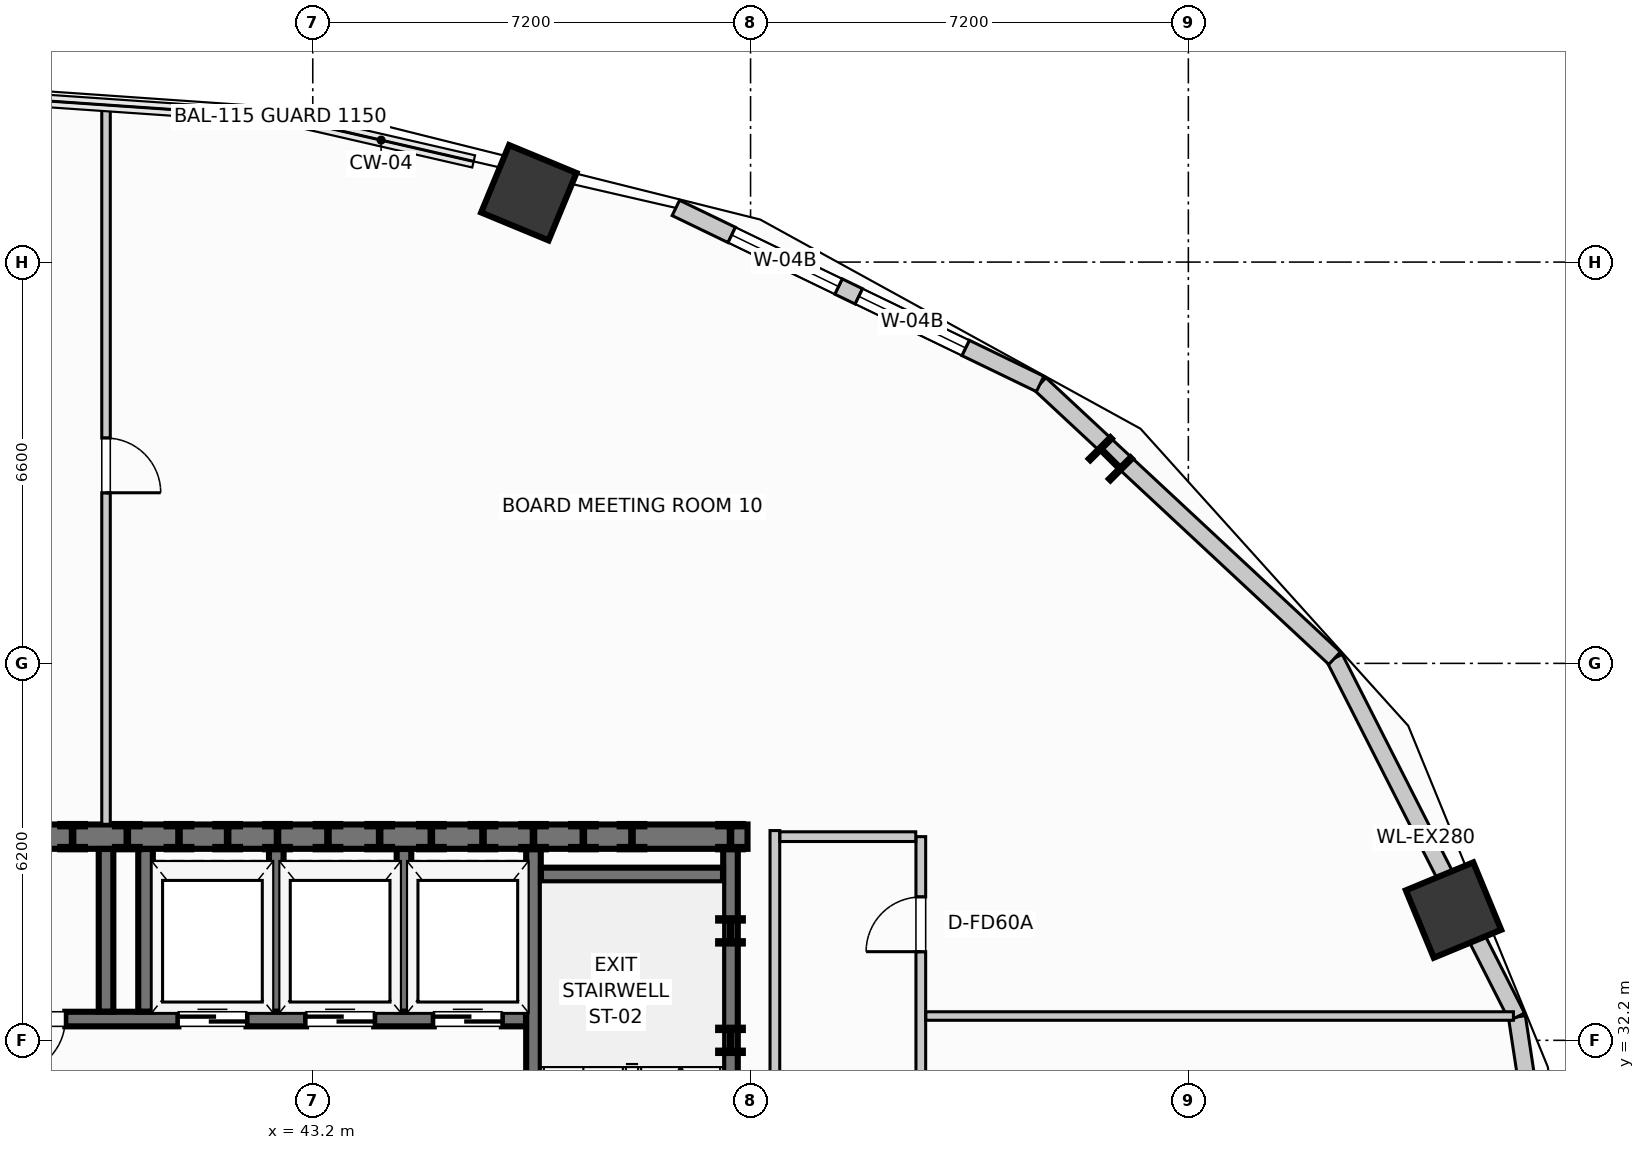
"""IFC4 building model, lengths in metres.
Left out: names, types, materials, properties, quantities, classifications, styles, units other than length and angle.
Written with IfcOpenShell. Run it as: python <this file> out.ifc"""

import sys

from ifc_helpers import new_model, si_unit, direction, frame, frame_2d, origin, origin_2d, place, context, subcontext, project, spatial, rectangle, i_section, extrude, element, fill, save


model = new_model("IFC4")
c1 = context("Model", 3, precision=1e-05, world=origin(), true_north=direction((0.0, 1.0)))
c2 = subcontext(c1, "Body", "Model", "MODEL_VIEW")
j1 = project(units=[si_unit("LENGTHUNIT", "METRE"), si_unit("PLANEANGLEUNIT", "RADIAN")], contexts=[c1])
p1 = place(None, origin())
s1 = spatial("IfcSite", under=j1, at=p1, CompositionType="ELEMENT")
p2 = place(p1, origin())
s2 = spatial("IfcBuilding", under=s1, at=p2, CompositionType="ELEMENT")
p3 = place(p2, frame((0.0, 0.0, 200.35)))
s3 = spatial("IfcBuildingStorey", under=s2, at=p3, CompositionType="ELEMENT", Elevation=200.35)
for number, where, z_axis, x_axis in (
    (1, (40.15, 35.55, 0.0), (0.0, 0.0, 1.0), (1.0, 0.0, 0.0)),
    (2, (41.8, 35.55, 0.0), (0.0, 0.0, 1.0), (1.0, 0.0, 0.0)),
    (3, (43.45, 35.55, 0.0), (0.0, 0.0, 1.0), (1.0, 0.0, 0.0)),
    (4, (45.15, 35.55, 0.0), (0.0, 0.0, 1.0), (1.0, 0.0, 0.0)),
    (5, (46.83, 35.55, 0.0), (0.0, 0.0, 1.0), (1.0, 0.0, 0.0)),
    (6, (48.45, 35.55, 0.0), (0.0, 0.0, 1.0), (1.0, 0.0, 0.0)),
    (7, (50.07, 35.55, 0.0), (0.0, 0.0, 1.0), (1.0, 0.0, 0.0)),
    (8, (50.07, 32.2, 0.0), (0.0, 0.0, 1.0), (1.0, 0.0, 0.0)),
    (9, (50.07, 34.0, 0.0), (0.0, 0.0, 1.0), (1.0, 0.0, 0.0)),
    (10, (42.62, 35.55, 0.0), (0.0, 0.0, 1.0), (1.0, 0.0, 0.0)),
    (11, (47.65, 35.55, 0.0), (0.0, 0.0, 1.0), (1.0, 0.0, 0.0)),
    (12, (39.25, 35.55, 0.0), (0.0, 0.0, 1.0), (1.0, 0.0, 0.0)),
    (13, (41.0, 35.55, 0.0), (0.0, 0.0, 1.0), (1.0, 0.0, 0.0)),
    (14, (44.3, 35.55, 0.0), (0.0, 0.0, 1.0), (1.0, 0.0, 0.0)),
    (15, (46.0, 35.55, 0.0), (0.0, 0.0, 1.0), (1.0, 0.0, 0.0)),
):
    element("IfcColumn", number, at=place(p3, frame(where, z_axis=z_axis, x_axis=x_axis)), inside=s3, PredefinedType="COLUMN", context=c2, shape_type="SweptSolid", body=[
        extrude(i_section(OverallWidth=0.406, OverallDepth=0.416, WebThickness=0.024, FlangeThickness=0.039, at=origin_2d()), origin(), (0.0, 0.0, 1.0), 4.5),
    ])
p4 = place(p3, frame((61.961, 34.343, 0.0), z_axis=(0.0, 0.0, 1.0), x_axis=(0.923879532511, 0.382683432365, 0.0)))
e16 = element("IfcColumn", 16, at=p4, inside=s3, PredefinedType="COLUMN", context=c2, shape_type="SweptSolid", body=[
    extrude(rectangle(XDim=1.2, YDim=1.2, at=origin_2d()), origin(), (0.0, 0.0, 1.0), 4.5),
])
p5 = place(p3, frame((56.318, 41.765, 0.0), z_axis=(0.0, 0.0, 1.0), x_axis=(0.707106781187, 0.707106781187, 0.0)))
e17 = element("IfcColumn", 17, at=p5, inside=s3, PredefinedType="COLUMN", context=c2, shape_type="SweptSolid", body=[
    extrude(i_section(OverallWidth=0.5, OverallDepth=0.5, WebThickness=0.022, FlangeThickness=0.032, at=origin_2d()), origin(), (0.0, 0.0, 1.0), 4.5),
])
p6 = place(p3, frame((46.753, 46.141, 0.0), z_axis=(0.0, 0.0, 1.0), x_axis=(0.382683432365, 0.923879532511, 0.0)))
e18 = element("IfcColumn", 18, at=p6, inside=s3, PredefinedType="COLUMN", context=c2, shape_type="SweptSolid", body=[
    extrude(rectangle(XDim=1.2, YDim=1.2, at=origin_2d()), origin(), (0.0, 0.0, 1.0), 4.5),
])
p7 = place(p3, frame((64.006, 26.0, 0.0), z_axis=(0.0, 0.0, 1.0), x_axis=(-0.150467697578, 0.988614926038, 0.0)))
e19 = element("IfcWall", 19, at=p7, inside=s3, PredefinedType="STANDARD", context=c2, shape_type="SweptSolid", body=[
    extrude(rectangle(XDim=6.661, YDim=0.28, at=frame_2d((3.33, 0.0))), origin(), (0.0, 0.0, 1.0), 4.26),
])
p8 = place(p7, frame((3.047, 0.0, 0.75)))
e20 = element("IfcOpeningElement", 20, at=p8, cuts=e19, PredefinedType="OPENING", context=c2, shape_type="SweptSolid", body=[
    extrude(rectangle(XDim=1.95, YDim=1.68, at=frame_2d((0.975, 0.84))), frame((0.0, 0.15, 0.0), z_axis=(0.0, -1.0, 0.0), x_axis=(1.0, 0.0, 0.0)), (0.0, 0.0, 1.0), 0.3),
])
p9 = place(p3, frame((63.004, 32.585, 0.0), z_axis=(0.0, 0.0, 1.0), x_axis=(-0.453032066879, 0.89149422117, 0.0)))
e21 = element("IfcWall", 21, at=p9, inside=s3, PredefinedType="STANDARD", context=c2, shape_type="SweptSolid", body=[
    extrude(rectangle(XDim=6.619, YDim=0.28, at=frame_2d((3.31, 0.0))), origin(), (0.0, 0.0, 1.0), 3.691),
])
p10 = place(p3, frame((60.006, 38.485, 0.0), z_axis=(0.0, 0.0, 1.0), x_axis=(-0.731833707499, 0.681483253329, 0.0)))
e22 = element("IfcWall", 22, at=p10, inside=s3, PredefinedType="STANDARD", context=c2, shape_type="SweptSolid", body=[
    extrude(rectangle(XDim=6.619, YDim=0.28, at=frame_2d((3.309, 0.0))), origin(), (0.0, 0.0, 1.0), 3.691),
])
p11 = place(p3, frame((55.162, 42.996, 0.0), z_axis=(0.0, 0.0, 1.0), x_axis=(-0.900371236029, 0.435122554381, 0.0)))
e23 = element("IfcWall", 23, at=p11, inside=s3, PredefinedType="STANDARD", context=c2, shape_type="SweptSolid", body=[
    extrude(rectangle(XDim=6.653, YDim=0.28, at=frame_2d((3.327, 0.0))), origin(), (0.0, 0.0, 1.0), 4.26),
])
p12 = place(p11, frame((1.361, 0.0, 0.75)))
e24 = element("IfcOpeningElement", 24, at=p12, cuts=e23, PredefinedType="OPENING", context=c2, shape_type="SweptSolid", body=[
    extrude(rectangle(XDim=1.95, YDim=1.68, at=frame_2d((0.975, 0.84))), frame((0.0, 0.15, 0.0), z_axis=(0.0, -1.0, 0.0), x_axis=(1.0, 0.0, 0.0)), (0.0, 0.0, 1.0), 0.3),
])
p13 = place(p11, frame((3.682, 0.0, 0.75)))
e25 = element("IfcOpeningElement", 25, at=p13, cuts=e23, PredefinedType="OPENING", context=c2, shape_type="SweptSolid", body=[
    extrude(rectangle(XDim=1.95, YDim=1.68, at=frame_2d((0.975, 0.84))), frame((0.0, 0.15, 0.0), z_axis=(0.0, -1.0, 0.0), x_axis=(1.0, 0.0, 0.0)), (0.0, 0.0, 1.0), 0.3),
])
p14 = place(p3, frame((50.35, 35.55, 0.0), z_axis=(0.0, 0.0, 1.0), x_axis=(-1.0, 0.0, 0.0)))
e26 = element("IfcWall", 26, at=p14, inside=s3, PredefinedType="SHEAR", context=c2, shape_type="SweptSolid", body=[
    extrude(rectangle(XDim=28.7, YDim=0.4, at=frame_2d((14.35, 0.0))), origin(), (0.0, 0.0, 1.0), 4.5),
])
for number, where, z_axis, x_axis in (
    (27, (50.07, 26.953, 0.0), (0.0, 0.0, 1.0), (0.0, 1.0, 0.0)),
    (28, (46.83, 26.953, 0.0), (0.0, 0.0, 1.0), (0.0, 1.0, 0.0)),
):
    element("IfcWall", number, at=place(p3, frame(where, z_axis=z_axis, x_axis=x_axis)), inside=s3, PredefinedType="SHEAR", context=c2, shape_type="SweptSolid", body=[
        extrude(rectangle(XDim=8.394, YDim=0.24, at=frame_2d((4.197, 0.0))), origin(), (0.0, 0.0, 1.0), 4.5),
    ])
p15 = place(p3, frame((46.953, 34.92, 0.0), z_axis=(0.0, 0.0, 1.0), x_axis=(1.0, 0.0, 0.0)))
e29 = element("IfcWall", 29, at=p15, inside=s3, PredefinedType="SHEAR", context=c2, shape_type="SweptSolid", body=[
    extrude(rectangle(XDim=2.994, YDim=0.24, at=frame_2d((1.497, 0.0))), origin(), (0.0, 0.0, 1.0), 4.5),
])
p16 = place(p3, frame((33.493, 32.55, 0.0), z_axis=(0.0, 0.0, 1.0), x_axis=(1.0, 0.0, 0.0)))
e30 = element("IfcWall", 30, at=p16, inside=s3, PredefinedType="SHEAR", context=c2, shape_type="SweptSolid", body=[
    extrude(rectangle(XDim=13.214, YDim=0.24, at=frame_2d((6.607, 0.0))), origin(), (0.0, 0.0, 1.0), 4.5),
])
p17 = place(p16, frame((1.557, 0.0, 0.0)))
e31 = element("IfcOpeningElement", 31, at=p17, cuts=e30, PredefinedType="OPENING", context=c2, shape_type="SweptSolid", body=[
    extrude(rectangle(XDim=0.9, YDim=2.0, at=frame_2d((0.45, 1.0))), frame((0.0, 0.13, 0.0), z_axis=(0.0, -1.0, 0.0), x_axis=(1.0, 0.0, 0.0)), (0.0, 0.0, 1.0), 0.26),
])
p18 = place(p16, frame((4.737, 0.0, 0.0)))
e32 = element("IfcOpeningElement", 32, at=p18, cuts=e30, PredefinedType="OPENING", context=c2, shape_type="SweptSolid", body=[
    extrude(rectangle(XDim=0.9, YDim=2.0, at=frame_2d((0.45, 1.0))), frame((0.0, 0.13, 0.0), z_axis=(0.0, -1.0, 0.0), x_axis=(1.0, 0.0, 0.0)), (0.0, 0.0, 1.0), 0.26),
])
p19 = place(p16, frame((7.497, 0.0, 0.0)))
e33 = element("IfcOpeningElement", 33, at=p19, cuts=e30, PredefinedType="OPENING", context=c2, shape_type="SweptSolid", body=[
    extrude(rectangle(XDim=1.12, YDim=2.0, at=frame_2d((0.56, 1.0))), frame((0.0, 0.13, 0.0), z_axis=(0.0, -1.0, 0.0), x_axis=(1.0, 0.0, 0.0)), (0.0, 0.0, 1.0), 0.26),
])
p20 = place(p16, frame((9.597, 0.0, 0.0)))
e34 = element("IfcOpeningElement", 34, at=p20, cuts=e30, PredefinedType="OPENING", context=c2, shape_type="SweptSolid", body=[
    extrude(rectangle(XDim=1.12, YDim=2.0, at=frame_2d((0.56, 1.0))), frame((0.0, 0.13, 0.0), z_axis=(0.0, -1.0, 0.0), x_axis=(1.0, 0.0, 0.0)), (0.0, 0.0, 1.0), 0.26),
])
p21 = place(p16, frame((11.697, 0.0, 0.0)))
e35 = element("IfcOpeningElement", 35, at=p21, cuts=e30, PredefinedType="OPENING", context=c2, shape_type="SweptSolid", body=[
    extrude(rectangle(XDim=1.12, YDim=2.0, at=frame_2d((0.56, 1.0))), frame((0.0, 0.13, 0.0), z_axis=(0.0, -1.0, 0.0), x_axis=(1.0, 0.0, 0.0)), (0.0, 0.0, 1.0), 0.26),
])
for number, where, z_axis, x_axis in (
    (36, (39.8, 32.673, 0.0), (0.0, 0.0, 1.0), (0.0, 1.0, 0.0)),
    (37, (40.45, 32.673, 0.0), (0.0, 0.0, 1.0), (0.0, 1.0, 0.0)),
    (38, (42.6, 32.673, 0.0), (0.0, 0.0, 1.0), (0.0, 1.0, 0.0)),
    (39, (44.7, 32.673, 0.0), (0.0, 0.0, 1.0), (0.0, 1.0, 0.0)),
):
    element("IfcWall", number, at=place(p3, frame(where, z_axis=z_axis, x_axis=x_axis)), inside=s3, PredefinedType="SHEAR", context=c2, shape_type="SweptSolid", body=[
        extrude(rectangle(XDim=2.674, YDim=0.24, at=frame_2d((1.337, 0.0))), origin(), (0.0, 0.0, 1.0), 4.5),
    ])
p22 = place(p3, frame((53.2, 19.8, 0.0), z_axis=(0.0, 0.0, 1.0), x_axis=(0.0, 1.0, 0.0)))
e40 = element("IfcWall", 40, at=p22, inside=s3, PredefinedType="PARTITIONING", context=c2, shape_type="SweptSolid", body=[
    extrude(rectangle(XDim=15.75, YDim=0.16, at=frame_2d((7.875, 0.0))), origin(), (0.0, 0.0, 1.0), 4.245),
])
p23 = place(p22, frame((8.203, 0.0, 0.0)))
e41 = element("IfcOpeningElement", 41, at=p23, cuts=e40, PredefinedType="OPENING", context=c2, shape_type="SweptSolid", body=[
    extrude(rectangle(XDim=0.9, YDim=2.0, at=frame_2d((0.45, 1.0))), frame((0.0, 0.09, 0.0), z_axis=(0.0, -1.0, 0.0), x_axis=(1.0, 0.0, 0.0)), (0.0, 0.0, 1.0), 0.18),
])
p24 = place(p22, frame((13.858, 0.0, 0.0)))
e42 = element("IfcOpeningElement", 42, at=p24, cuts=e40, PredefinedType="OPENING", context=c2, shape_type="SweptSolid", body=[
    extrude(rectangle(XDim=0.9, YDim=2.0, at=frame_2d((0.45, 1.0))), frame((0.0, 0.09, 0.0), z_axis=(0.0, -1.0, 0.0), x_axis=(1.0, 0.0, 0.0)), (0.0, 0.0, 1.0), 0.18),
])
p25 = place(p3, frame((50.8, 26.65, 0.0), z_axis=(0.0, 0.0, 1.0), x_axis=(0.0, 1.0, 0.0)))
e43 = element("IfcWall", 43, at=p25, inside=s3, PredefinedType="PARTITIONING", context=c2, shape_type="SweptSolid", body=[
    extrude(rectangle(XDim=9.0, YDim=0.16, at=frame_2d((4.5, 0.0))), origin(), (0.0, 0.0, 1.0), 4.245),
])
p26 = place(p3, frame((50.883, 35.55, 0.0), z_axis=(0.0, 0.0, 1.0), x_axis=(1.0, 0.0, 0.0)))
e44 = element("IfcWall", 44, at=p26, inside=s3, PredefinedType="PARTITIONING", context=c2, shape_type="SweptSolid", body=[
    extrude(rectangle(XDim=2.234, YDim=0.16, at=frame_2d((1.117, 0.0))), origin(), (0.0, 0.0, 1.0), 4.245),
])
p27 = place(p3, frame((53.283, 32.6, 0.0), z_axis=(0.0, 0.0, 1.0), x_axis=(1.0, 0.0, 0.0)))
e45 = element("IfcWall", 45, at=p27, inside=s3, PredefinedType="PARTITIONING", context=c2, shape_type="SweptSolid", body=[
    extrude(rectangle(XDim=9.663, YDim=0.14, at=frame_2d((4.832, 0.0))), origin(), (0.0, 0.0, 1.0), 4.245),
])
p28 = place(p3, frame((39.8, 35.753, 0.0), z_axis=(0.0, 0.0, 1.0), x_axis=(0.0, 1.0, 0.0)))
e46 = element("IfcWall", 46, at=p28, inside=s3, PredefinedType="PARTITIONING", context=c2, shape_type="SweptSolid", body=[
    extrude(rectangle(XDim=11.786, YDim=0.14, at=frame_2d((5.893, 0.0))), origin(), (0.0, 0.0, 1.0), 4.245),
])
p29 = place(p28, frame((5.453, 0.0, 0.0)))
e47 = element("IfcOpeningElement", 47, at=p29, cuts=e46, PredefinedType="OPENING", context=c2, shape_type="SweptSolid", body=[
    extrude(rectangle(XDim=0.9, YDim=2.0, at=frame_2d((0.45, 1.0))), frame((0.0, 0.08, 0.0), z_axis=(0.0, -1.0, 0.0), x_axis=(1.0, 0.0, 0.0)), (0.0, 0.0, 1.0), 0.16),
])
p30 = place(p12, origin())
e48 = element("IfcWindow", 48, at=p30, inside=s3, PartitioningType="SINGLE_PANEL", PredefinedType="WINDOW", context=c2, shape_type="SweptSolid", body=[
    extrude(rectangle(XDim=1.95, YDim=1.68, at=frame_2d((0.975, 0.84))), frame((0.0, 0.03, 0.0), z_axis=(0.0, -1.0, 0.0), x_axis=(1.0, 0.0, 0.0)), (0.0, 0.0, 1.0), 0.06),
])
fill(e24, e48)
p31 = place(p13, origin())
e49 = element("IfcWindow", 49, at=p31, inside=s3, PartitioningType="SINGLE_PANEL", PredefinedType="WINDOW", context=c2, shape_type="SweptSolid", body=[
    extrude(rectangle(XDim=1.95, YDim=1.68, at=frame_2d((0.975, 0.84))), frame((0.0, 0.03, 0.0), z_axis=(0.0, -1.0, 0.0), x_axis=(1.0, 0.0, 0.0)), (0.0, 0.0, 1.0), 0.06),
])
fill(e25, e49)
p32 = place(p18, frame((0.9, 0.0, 0.0), z_axis=(0.0, 0.0, 1.0), x_axis=(-1.0, 0.0, 0.0)))
e50 = element("IfcDoor", 50, at=p32, inside=s3, OperationType="SINGLE_SWING_RIGHT", PredefinedType="DOOR", context=c2, shape_type="SweptSolid", body=[
    extrude(rectangle(XDim=0.9, YDim=2.0, at=frame_2d((0.45, 1.0))), frame((0.0, 0.025, 0.0), z_axis=(0.0, -1.0, 0.0), x_axis=(1.0, 0.0, 0.0)), (0.0, 0.0, 1.0), 0.05),
])
fill(e32, e50)
p33 = place(p19, origin())
e51 = element("IfcDoor", 51, at=p33, inside=s3, OperationType="DOUBLE_DOOR_SLIDING", PredefinedType="USERDEFINED", context=c2, shape_type="SweptSolid", body=[
    extrude(rectangle(XDim=1.12, YDim=2.0, at=frame_2d((0.56, 1.0))), frame((0.0, 0.025, 0.0), z_axis=(0.0, -1.0, 0.0), x_axis=(1.0, 0.0, 0.0)), (0.0, 0.0, 1.0), 0.05),
])
fill(e33, e51)
p34 = place(p20, origin())
e52 = element("IfcDoor", 52, at=p34, inside=s3, OperationType="DOUBLE_DOOR_SLIDING", PredefinedType="USERDEFINED", context=c2, shape_type="SweptSolid", body=[
    extrude(rectangle(XDim=1.12, YDim=2.0, at=frame_2d((0.56, 1.0))), frame((0.0, 0.025, 0.0), z_axis=(0.0, -1.0, 0.0), x_axis=(1.0, 0.0, 0.0)), (0.0, 0.0, 1.0), 0.05),
])
fill(e34, e52)
p35 = place(p21, origin())
e53 = element("IfcDoor", 53, at=p35, inside=s3, OperationType="DOUBLE_DOOR_SLIDING", PredefinedType="USERDEFINED", context=c2, shape_type="SweptSolid", body=[
    extrude(rectangle(XDim=1.12, YDim=2.0, at=frame_2d((0.56, 1.0))), frame((0.0, 0.025, 0.0), z_axis=(0.0, -1.0, 0.0), x_axis=(1.0, 0.0, 0.0)), (0.0, 0.0, 1.0), 0.05),
])
fill(e35, e53)
p36 = place(p24, origin())
e54 = element("IfcDoor", 54, at=p36, inside=s3, OperationType="SINGLE_SWING_LEFT", PredefinedType="DOOR", context=c2, shape_type="SweptSolid", body=[
    extrude(rectangle(XDim=0.9, YDim=2.0, at=frame_2d((0.45, 1.0))), frame((0.0, 0.025, 0.0), z_axis=(0.0, -1.0, 0.0), x_axis=(1.0, 0.0, 0.0)), (0.0, 0.0, 1.0), 0.05),
])
fill(e42, e54)
p37 = place(p29, frame((0.9, 0.0, 0.0), z_axis=(0.0, 0.0, 1.0), x_axis=(-1.0, 0.0, 0.0)))
e55 = element("IfcDoor", 55, at=p37, inside=s3, OperationType="SINGLE_SWING_RIGHT", PredefinedType="DOOR", context=c2, shape_type="SweptSolid", body=[
    extrude(rectangle(XDim=0.9, YDim=2.0, at=frame_2d((0.45, 1.0))), frame((0.0, 0.025, 0.0), z_axis=(0.0, -1.0, 0.0), x_axis=(1.0, 0.0, 0.0)), (0.0, 0.0, 1.0), 0.05),
])
fill(e47, e55)
save(model, sys.argv[1])
